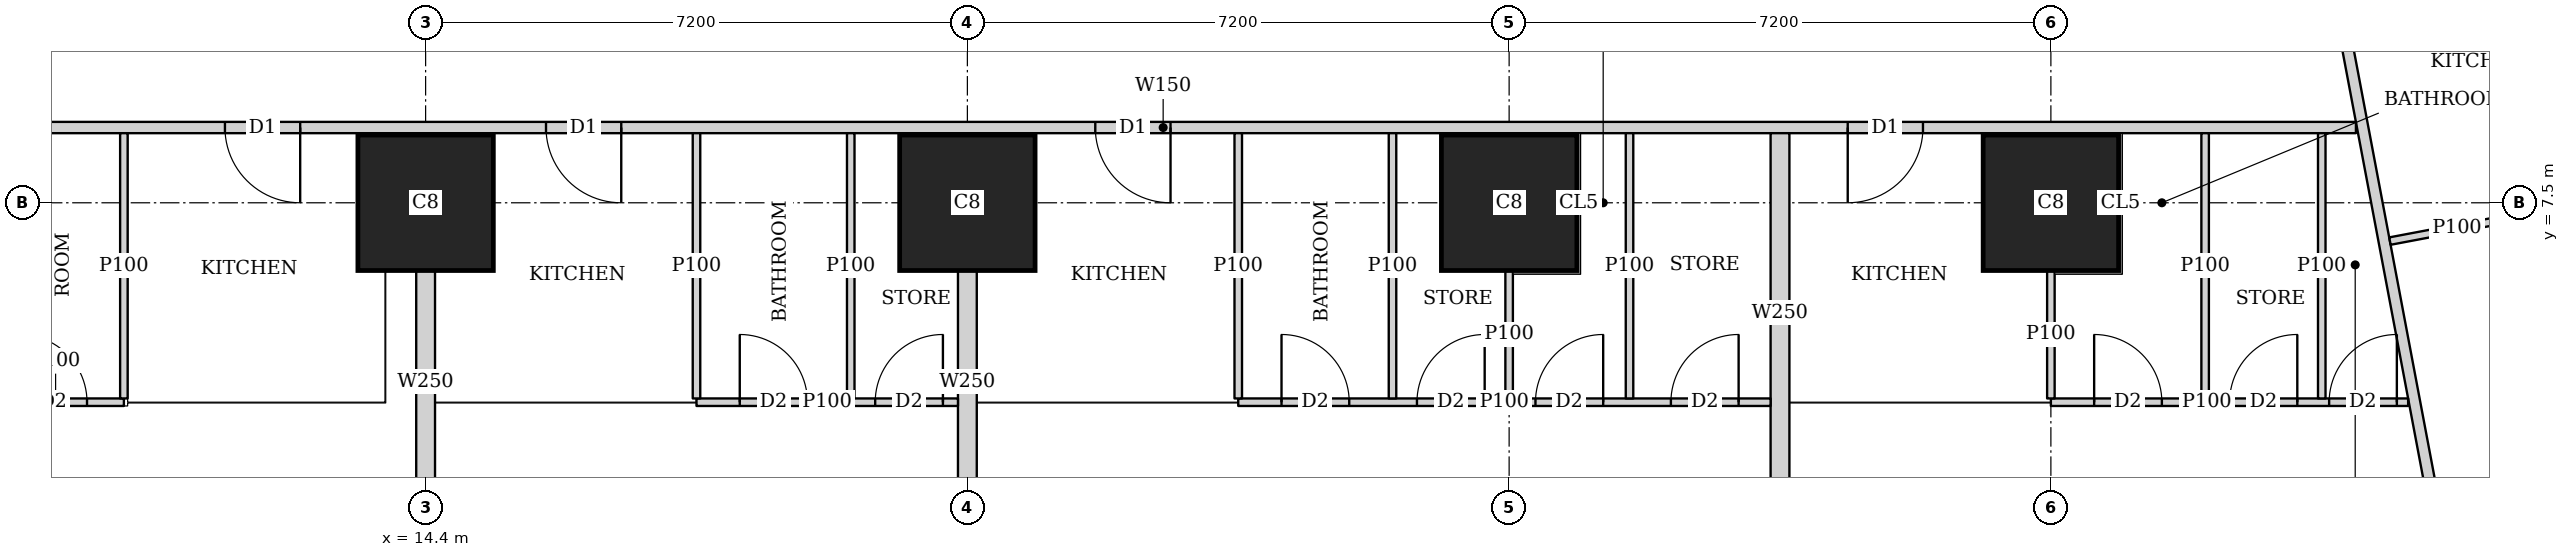
"""IFC4 building model, lengths in metres.
Left out: names, types, materials, properties, quantities, classifications, styles, units other than length and angle.
Written with IfcOpenShell. Run it as: python <this file> out.ifc"""

import sys

from ifc_helpers import new_model, si_unit, direction, frame, frame_2d, origin, origin_2d, place, context, subcontext, project, spatial, rectangle, extrude, element, fill, save


model = new_model("IFC4")
c1 = context("Model", 3, precision=1e-05, world=origin(), true_north=direction((0.0, 1.0)))
c2 = subcontext(c1, "Body", "Model", "MODEL_VIEW")
j1 = project(units=[si_unit("LENGTHUNIT", "METRE"), si_unit("PLANEANGLEUNIT", "RADIAN")], contexts=[c1])
p1 = place(None, origin())
s1 = spatial("IfcSite", under=j1, at=p1, CompositionType="ELEMENT")
p2 = place(p1, origin())
s2 = spatial("IfcBuilding", under=s1, at=p2, CompositionType="ELEMENT")
p3 = place(p2, frame((0.0, 0.0, 23.75)))
s3 = spatial("IfcBuildingStorey", under=s2, at=p3, CompositionType="ELEMENT", Elevation=23.75)
for number, where, z_axis, x_axis in (
    (1, (14.4, 7.5, 0.0), (0.0, 0.0, 1.0), (1.0, 0.0, 0.0)),
    (2, (21.6, 7.5, 0.0), (0.0, 0.0, 1.0), (1.0, 0.0, 0.0)),
    (3, (28.8, 7.5, 0.0), (0.0, 0.0, 1.0), (1.0, 0.0, 0.0)),
    (4, (36.0, 7.5, 0.0), (0.0, 0.0, 1.0), (1.0, 0.0, 0.0)),
):
    element("IfcColumn", number, at=place(p3, frame(where, z_axis=z_axis, x_axis=x_axis)), inside=s3, PredefinedType="COLUMN", context=c2, shape_type="SweptSolid", body=[
        extrude(rectangle(XDim=1.8, YDim=1.8, at=origin_2d()), origin(), (0.0, 0.0, 1.0), 3.75),
    ])
p4 = place(p3, frame((40.054, 8.5, 0.0), z_axis=(0.0, 0.0, 1.0), x_axis=(-1.0, 0.0, 0.0)))
e5 = element("IfcWall", 5, at=p4, inside=s3, PredefinedType="SOLIDWALL", context=c2, shape_type="SweptSolid", body=[
    extrude(rectangle(XDim=31.704, YDim=0.15, at=frame_2d((15.852, 0.0))), origin(), (0.0, 0.0, 1.0), 3.5),
])
p5 = place(p4, frame((27.321, 0.0, 0.0)))
e6 = element("IfcOpeningElement", 6, at=p5, cuts=e5, PredefinedType="OPENING", context=c2, shape_type="SweptSolid", body=[
    extrude(rectangle(XDim=1.0, YDim=2.1, at=frame_2d((0.5, 1.05))), frame((0.0, 0.085, 0.0), z_axis=(0.0, -1.0, 0.0), x_axis=(1.0, 0.0, 0.0)), (0.0, 0.0, 1.0), 0.17),
])
p6 = place(p4, frame((23.054, 0.0, 0.0)))
e7 = element("IfcOpeningElement", 7, at=p6, cuts=e5, PredefinedType="OPENING", context=c2, shape_type="SweptSolid", body=[
    extrude(rectangle(XDim=1.0, YDim=2.1, at=frame_2d((0.5, 1.05))), frame((0.0, 0.085, 0.0), z_axis=(0.0, -1.0, 0.0), x_axis=(1.0, 0.0, 0.0)), (0.0, 0.0, 1.0), 0.17),
])
p7 = place(p4, frame((15.754, 0.0, 0.0)))
e8 = element("IfcOpeningElement", 8, at=p7, cuts=e5, PredefinedType="OPENING", context=c2, shape_type="SweptSolid", body=[
    extrude(rectangle(XDim=1.0, YDim=2.1, at=frame_2d((0.5, 1.05))), frame((0.0, 0.085, 0.0), z_axis=(0.0, -1.0, 0.0), x_axis=(1.0, 0.0, 0.0)), (0.0, 0.0, 1.0), 0.17),
])
p8 = place(p4, frame((5.754, 0.0, 0.0)))
e9 = element("IfcOpeningElement", 9, at=p8, cuts=e5, PredefinedType="OPENING", context=c2, shape_type="SweptSolid", body=[
    extrude(rectangle(XDim=1.0, YDim=2.1, at=frame_2d((0.5, 1.05))), frame((0.0, 0.085, 0.0), z_axis=(0.0, -1.0, 0.0), x_axis=(1.0, 0.0, 0.0)), (0.0, 0.0, 1.0), 0.17),
])
p9 = place(p3, frame((33.755, 42.325, 0.0), z_axis=(0.0, 0.0, 1.0), x_axis=(0.185611461091, -0.982623216453, 0.0)))
e10 = element("IfcWall", 10, at=p9, inside=s3, PredefinedType="SOLIDWALL", context=c2, shape_type="SweptSolid", body=[
    extrude(rectangle(XDim=40.241, YDim=0.15, at=frame_2d((20.121, 0.0))), origin(), (0.0, 0.0, 1.0), 2.5),
])
p10 = place(p9, frame((7.325, 0.0, 0.0)))
e11 = element("IfcOpeningElement", 11, at=p10, cuts=e10, PredefinedType="OPENING", context=c2, shape_type="SweptSolid", body=[
    extrude(rectangle(XDim=1.0, YDim=2.1, at=frame_2d((0.5, 1.05))), frame((0.0, 0.085, 0.0), z_axis=(0.0, -1.0, 0.0), x_axis=(1.0, 0.0, 0.0)), (0.0, 0.0, 1.0), 0.17),
])
p11 = place(p9, frame((11.902, 0.0, 0.0)))
e12 = element("IfcOpeningElement", 12, at=p11, cuts=e10, PredefinedType="OPENING", context=c2, shape_type="SweptSolid", body=[
    extrude(rectangle(XDim=1.0, YDim=2.1, at=frame_2d((0.5, 1.05))), frame((0.0, 0.085, 0.0), z_axis=(0.0, -1.0, 0.0), x_axis=(1.0, 0.0, 0.0)), (0.0, 0.0, 1.0), 0.17),
])
p12 = place(p9, frame((25.718, 0.0, 0.0)))
e13 = element("IfcOpeningElement", 13, at=p12, cuts=e10, PredefinedType="OPENING", context=c2, shape_type="SweptSolid", body=[
    extrude(rectangle(XDim=1.0, YDim=2.1, at=frame_2d((0.5, 1.05))), frame((0.0, 0.085, 0.0), z_axis=(0.0, -1.0, 0.0), x_axis=(1.0, 0.0, 0.0)), (0.0, 0.0, 1.0), 0.17),
])
p13 = place(p9, frame((31.788, 0.0, 0.0)))
e14 = element("IfcOpeningElement", 14, at=p13, cuts=e10, PredefinedType="OPENING", context=c2, shape_type="SweptSolid", body=[
    extrude(rectangle(XDim=1.0, YDim=2.1, at=frame_2d((0.5, 1.05))), frame((0.0, 0.085, 0.0), z_axis=(0.0, -1.0, 0.0), x_axis=(1.0, 0.0, 0.0)), (0.0, 0.0, 1.0), 0.17),
])
p14 = place(p3, frame((10.39, 4.85, 0.0), z_axis=(0.0, 0.0, 1.0), x_axis=(-1.0, 0.0, 0.0)))
e15 = element("IfcWall", 15, at=p14, inside=s3, PredefinedType="PARTITIONING", context=c2, shape_type="SweptSolid", body=[
    extrude(rectangle(XDim=1.815, YDim=0.1, at=frame_2d((0.907, 0.0))), origin(), (0.0, 0.0, 1.0), 3.5),
])
p15 = place(p14, frame((0.49, 0.0, 0.0)))
e16 = element("IfcOpeningElement", 16, at=p15, cuts=e15, PredefinedType="OPENING", context=c2, shape_type="SweptSolid", body=[
    extrude(rectangle(XDim=0.9, YDim=2.1, at=frame_2d((0.45, 1.05))), frame((0.0, 0.06, 0.0), z_axis=(0.0, -1.0, 0.0), x_axis=(1.0, 0.0, 0.0)), (0.0, 0.0, 1.0), 0.12),
])
p16 = place(p3, frame((10.39, 4.9, 0.0), z_axis=(0.0, 0.0, 1.0), x_axis=(0.0, 1.0, 0.0)))
e17 = element("IfcWall", 17, at=p16, inside=s3, PredefinedType="PARTITIONING", context=c2, shape_type="SweptSolid", body=[
    extrude(rectangle(XDim=3.525, YDim=0.1, at=frame_2d((1.763, 0.0))), origin(), (0.0, 0.0, 1.0), 3.5),
])
p17 = place(p3, frame((21.475, 4.85, 0.0), z_axis=(0.0, 0.0, 1.0), x_axis=(-1.0, 0.0, 0.0)))
e18 = element("IfcWall", 18, at=p17, inside=s3, PredefinedType="PARTITIONING", context=c2, shape_type="SweptSolid", body=[
    extrude(rectangle(XDim=3.475, YDim=0.1, at=frame_2d((1.738, 0.0))), origin(), (0.0, 0.0, 1.0), 3.5),
])
p18 = place(p17, frame((2.0, 0.0, 0.0)))
e19 = element("IfcOpeningElement", 19, at=p18, cuts=e18, PredefinedType="OPENING", context=c2, shape_type="SweptSolid", body=[
    extrude(rectangle(XDim=0.9, YDim=2.1, at=frame_2d((0.45, 1.05))), frame((0.0, 0.06, 0.0), z_axis=(0.0, -1.0, 0.0), x_axis=(1.0, 0.0, 0.0)), (0.0, 0.0, 1.0), 0.12),
])
p19 = place(p17, frame((0.2, 0.0, 0.0)))
e20 = element("IfcOpeningElement", 20, at=p19, cuts=e18, PredefinedType="OPENING", context=c2, shape_type="SweptSolid", body=[
    extrude(rectangle(XDim=0.9, YDim=2.1, at=frame_2d((0.45, 1.05))), frame((0.0, 0.06, 0.0), z_axis=(0.0, -1.0, 0.0), x_axis=(1.0, 0.0, 0.0)), (0.0, 0.0, 1.0), 0.12),
])
for number, where, z_axis, x_axis in (
    (21, (18.0, 4.9, 0.0), (0.0, 0.0, 1.0), (0.0, 1.0, 0.0)),
    (22, (20.05, 4.9, 0.0), (0.0, 0.0, 1.0), (0.0, 1.0, 0.0)),
):
    element("IfcWall", number, at=place(p3, frame(where, z_axis=z_axis, x_axis=x_axis)), inside=s3, PredefinedType="PARTITIONING", context=c2, shape_type="SweptSolid", body=[
        extrude(rectangle(XDim=3.525, YDim=0.1, at=frame_2d((1.763, 0.0))), origin(), (0.0, 0.0, 1.0), 3.5),
    ])
p20 = place(p3, frame((14.4, 3.65, 0.0), z_axis=(0.0, 0.0, 1.0), x_axis=(0.0, 1.0, 0.0)))
e23 = element("IfcWall", 23, at=p20, inside=s3, PredefinedType="SOLIDWALL", context=c2, shape_type="SweptSolid", body=[
    extrude(rectangle(XDim=2.949, YDim=0.25, at=frame_2d((1.475, 0.0))), origin(), (0.0, 0.0, 1.0), 3.5),
])
p21 = place(p3, frame((32.275, 4.85, 0.0), z_axis=(0.0, 0.0, 1.0), x_axis=(-1.0, 0.0, 0.0)))
e24 = element("IfcWall", 24, at=p21, inside=s3, PredefinedType="PARTITIONING", context=c2, shape_type="SweptSolid", body=[
    extrude(rectangle(XDim=7.075, YDim=0.1, at=frame_2d((3.538, 0.0))), origin(), (0.0, 0.0, 1.0), 3.5),
])
p22 = place(p21, frame((5.6, 0.0, 0.0)))
e25 = element("IfcOpeningElement", 25, at=p22, cuts=e24, PredefinedType="OPENING", context=c2, shape_type="SweptSolid", body=[
    extrude(rectangle(XDim=0.9, YDim=2.1, at=frame_2d((0.45, 1.05))), frame((0.0, 0.06, 0.0), z_axis=(0.0, -1.0, 0.0), x_axis=(1.0, 0.0, 0.0)), (0.0, 0.0, 1.0), 0.12),
])
p23 = place(p21, frame((2.225, 0.0, 0.0)))
e26 = element("IfcOpeningElement", 26, at=p23, cuts=e24, PredefinedType="OPENING", context=c2, shape_type="SweptSolid", body=[
    extrude(rectangle(XDim=0.9, YDim=2.1, at=frame_2d((0.45, 1.05))), frame((0.0, 0.06, 0.0), z_axis=(0.0, -1.0, 0.0), x_axis=(1.0, 0.0, 0.0)), (0.0, 0.0, 1.0), 0.12),
])
p24 = place(p21, frame((3.8, 0.0, 0.0)))
e27 = element("IfcOpeningElement", 27, at=p24, cuts=e24, PredefinedType="OPENING", context=c2, shape_type="SweptSolid", body=[
    extrude(rectangle(XDim=0.9, YDim=2.1, at=frame_2d((0.45, 1.05))), frame((0.0, 0.06, 0.0), z_axis=(0.0, -1.0, 0.0), x_axis=(1.0, 0.0, 0.0)), (0.0, 0.0, 1.0), 0.12),
])
p25 = place(p21, frame((0.425, 0.0, 0.0)))
e28 = element("IfcOpeningElement", 28, at=p25, cuts=e24, PredefinedType="OPENING", context=c2, shape_type="SweptSolid", body=[
    extrude(rectangle(XDim=0.9, YDim=2.1, at=frame_2d((0.45, 1.05))), frame((0.0, 0.06, 0.0), z_axis=(0.0, -1.0, 0.0), x_axis=(1.0, 0.0, 0.0)), (0.0, 0.0, 1.0), 0.12),
])
p26 = place(p3, frame((25.2, 4.9, 0.0), z_axis=(0.0, 0.0, 1.0), x_axis=(0.0, 1.0, 0.0)))
e29 = element("IfcWall", 29, at=p26, inside=s3, PredefinedType="PARTITIONING", context=c2, shape_type="SweptSolid", body=[
    extrude(rectangle(XDim=3.525, YDim=0.1, at=frame_2d((1.763, 0.0))), origin(), (0.0, 0.0, 1.0), 3.5),
])
p27 = place(p3, frame((28.8, 4.9, 0.0), z_axis=(0.0, 0.0, 1.0), x_axis=(0.0, 1.0, 0.0)))
e30 = element("IfcWall", 30, at=p27, inside=s3, PredefinedType="PARTITIONING", context=c2, shape_type="SweptSolid", body=[
    extrude(rectangle(XDim=1.699, YDim=0.1, at=frame_2d((0.85, 0.0))), origin(), (0.0, 0.0, 1.0), 3.5),
])
for number, where, z_axis, x_axis in (
    (31, (27.25, 4.9, 0.0), (0.0, 0.0, 1.0), (0.0, 1.0, 0.0)),
    (32, (30.4, 4.9, 0.0), (0.0, 0.0, 1.0), (0.0, 1.0, 0.0)),
):
    element("IfcWall", number, at=place(p3, frame(where, z_axis=z_axis, x_axis=x_axis)), inside=s3, PredefinedType="PARTITIONING", context=c2, shape_type="SweptSolid", body=[
        extrude(rectangle(XDim=3.525, YDim=0.1, at=frame_2d((1.763, 0.0))), origin(), (0.0, 0.0, 1.0), 3.5),
    ])
p28 = place(p3, frame((21.6, 3.65, 0.0), z_axis=(0.0, 0.0, 1.0), x_axis=(0.0, 1.0, 0.0)))
e33 = element("IfcWall", 33, at=p28, inside=s3, PredefinedType="SOLIDWALL", context=c2, shape_type="SweptSolid", body=[
    extrude(rectangle(XDim=2.949, YDim=0.25, at=frame_2d((1.475, 0.0))), origin(), (0.0, 0.0, 1.0), 3.5),
])
p29 = place(p3, frame((40.748, 4.85, 0.0), z_axis=(0.0, 0.0, 1.0), x_axis=(-1.0, 0.0, 0.0)))
e34 = element("IfcWall", 34, at=p29, inside=s3, PredefinedType="PARTITIONING", context=c2, shape_type="SweptSolid", body=[
    extrude(rectangle(XDim=4.748, YDim=0.1, at=frame_2d((2.374, 0.0))), origin(), (0.0, 0.0, 1.0), 3.5),
])
p30 = place(p29, frame((3.273, 0.0, 0.0)))
e35 = element("IfcOpeningElement", 35, at=p30, cuts=e34, PredefinedType="OPENING", context=c2, shape_type="SweptSolid", body=[
    extrude(rectangle(XDim=0.9, YDim=2.1, at=frame_2d((0.45, 1.05))), frame((0.0, 0.06, 0.0), z_axis=(0.0, -1.0, 0.0), x_axis=(1.0, 0.0, 0.0)), (0.0, 0.0, 1.0), 0.12),
])
p31 = place(p29, frame((0.15, 0.0, 0.0)))
e36 = element("IfcOpeningElement", 36, at=p31, cuts=e34, PredefinedType="OPENING", context=c2, shape_type="SweptSolid", body=[
    extrude(rectangle(XDim=0.9, YDim=2.1, at=frame_2d((0.45, 1.05))), frame((0.0, 0.06, 0.0), z_axis=(0.0, -1.0, 0.0), x_axis=(1.0, 0.0, 0.0)), (0.0, 0.0, 1.0), 0.12),
])
p32 = place(p29, frame((1.473, 0.0, 0.0)))
e37 = element("IfcOpeningElement", 37, at=p32, cuts=e34, PredefinedType="OPENING", context=c2, shape_type="SweptSolid", body=[
    extrude(rectangle(XDim=0.9, YDim=2.1, at=frame_2d((0.45, 1.05))), frame((0.0, 0.06, 0.0), z_axis=(0.0, -1.0, 0.0), x_axis=(1.0, 0.0, 0.0)), (0.0, 0.0, 1.0), 0.12),
])
p33 = place(p3, frame((36.0, 4.9, 0.0), z_axis=(0.0, 0.0, 1.0), x_axis=(0.0, 1.0, 0.0)))
e38 = element("IfcWall", 38, at=p33, inside=s3, PredefinedType="PARTITIONING", context=c2, shape_type="SweptSolid", body=[
    extrude(rectangle(XDim=1.699, YDim=0.1, at=frame_2d((0.85, 0.0))), origin(), (0.0, 0.0, 1.0), 3.5),
])
for number, where, z_axis, x_axis in (
    (39, (39.6, 4.9, 0.0), (0.0, 0.0, 1.0), (0.0, 1.0, 0.0)),
    (40, (38.05, 4.9, 0.0), (0.0, 0.0, 1.0), (0.0, 1.0, 0.0)),
):
    element("IfcWall", number, at=place(p3, frame(where, z_axis=z_axis, x_axis=x_axis)), inside=s3, PredefinedType="PARTITIONING", context=c2, shape_type="SweptSolid", body=[
        extrude(rectangle(XDim=3.525, YDim=0.1, at=frame_2d((1.763, 0.0))), origin(), (0.0, 0.0, 1.0), 3.5),
    ])
p34 = place(p3, frame((32.4, 3.65, 0.0), z_axis=(0.0, 0.0, 1.0), x_axis=(0.0, 1.0, 0.0)))
e41 = element("IfcWall", 41, at=p34, inside=s3, PredefinedType="SOLIDWALL", context=c2, shape_type="SweptSolid", body=[
    extrude(rectangle(XDim=4.775, YDim=0.25, at=frame_2d((2.388, 0.0))), origin(), (0.0, 0.0, 1.0), 3.5),
])
p35 = place(p3, frame((42.29, 7.328, 0.0), z_axis=(0.0, 0.0, 1.0), x_axis=(-0.98262927905, -0.185579362952, 0.0)))
e42 = element("IfcWall", 42, at=p35, inside=s3, PredefinedType="PARTITIONING", context=c2, shape_type="SweptSolid", body=[
    extrude(rectangle(XDim=1.815, YDim=0.1, at=frame_2d((0.908, 0.0))), origin(), (0.0, 0.0, 1.0), 3.5),
])
p36 = place(p15, origin())
e43 = element("IfcDoor", 43, at=p36, inside=s3, OperationType="SINGLE_SWING_LEFT", PredefinedType="DOOR", context=c2, shape_type="SweptSolid", body=[
    extrude(rectangle(XDim=0.9, YDim=2.1, at=frame_2d((0.45, 1.05))), frame((0.0, 0.025, 0.0), z_axis=(0.0, -1.0, 0.0), x_axis=(1.0, 0.0, 0.0)), (0.0, 0.0, 1.0), 0.05),
])
fill(e16, e43)
p37 = place(p5, origin())
e44 = element("IfcDoor", 44, at=p37, inside=s3, OperationType="SINGLE_SWING_LEFT", PredefinedType="DOOR", context=c2, shape_type="SweptSolid", body=[
    extrude(rectangle(XDim=1.0, YDim=2.1, at=frame_2d((0.5, 1.05))), frame((0.0, 0.025, 0.0), z_axis=(0.0, -1.0, 0.0), x_axis=(1.0, 0.0, 0.0)), (0.0, 0.0, 1.0), 0.05),
])
fill(e6, e44)
p38 = place(p18, origin())
e45 = element("IfcDoor", 45, at=p38, inside=s3, OperationType="SINGLE_SWING_LEFT", PredefinedType="DOOR", context=c2, shape_type="SweptSolid", body=[
    extrude(rectangle(XDim=0.9, YDim=2.1, at=frame_2d((0.45, 1.05))), frame((0.0, 0.025, 0.0), z_axis=(0.0, -1.0, 0.0), x_axis=(1.0, 0.0, 0.0)), (0.0, 0.0, 1.0), 0.05),
])
fill(e19, e45)
p39 = place(p19, origin())
e46 = element("IfcDoor", 46, at=p39, inside=s3, OperationType="SINGLE_SWING_RIGHT", PredefinedType="DOOR", context=c2, shape_type="SweptSolid", body=[
    extrude(rectangle(XDim=0.9, YDim=2.1, at=frame_2d((0.45, 1.05))), frame((0.0, 0.025, 0.0), z_axis=(0.0, -1.0, 0.0), x_axis=(1.0, 0.0, 0.0)), (0.0, 0.0, 1.0), 0.05),
])
fill(e20, e46)
p40 = place(p6, origin())
e47 = element("IfcDoor", 47, at=p40, inside=s3, OperationType="SINGLE_SWING_LEFT", PredefinedType="DOOR", context=c2, shape_type="SweptSolid", body=[
    extrude(rectangle(XDim=1.0, YDim=2.1, at=frame_2d((0.5, 1.05))), frame((0.0, 0.025, 0.0), z_axis=(0.0, -1.0, 0.0), x_axis=(1.0, 0.0, 0.0)), (0.0, 0.0, 1.0), 0.05),
])
fill(e7, e47)
p41 = place(p22, origin())
e48 = element("IfcDoor", 48, at=p41, inside=s3, OperationType="SINGLE_SWING_LEFT", PredefinedType="DOOR", context=c2, shape_type="SweptSolid", body=[
    extrude(rectangle(XDim=0.9, YDim=2.1, at=frame_2d((0.45, 1.05))), frame((0.0, 0.025, 0.0), z_axis=(0.0, -1.0, 0.0), x_axis=(1.0, 0.0, 0.0)), (0.0, 0.0, 1.0), 0.05),
])
fill(e25, e48)
p42 = place(p23, origin())
e49 = element("IfcDoor", 49, at=p42, inside=s3, OperationType="SINGLE_SWING_RIGHT", PredefinedType="DOOR", context=c2, shape_type="SweptSolid", body=[
    extrude(rectangle(XDim=0.9, YDim=2.1, at=frame_2d((0.45, 1.05))), frame((0.0, 0.025, 0.0), z_axis=(0.0, -1.0, 0.0), x_axis=(1.0, 0.0, 0.0)), (0.0, 0.0, 1.0), 0.05),
])
fill(e26, e49)
p43 = place(p24, origin())
e50 = element("IfcDoor", 50, at=p43, inside=s3, OperationType="SINGLE_SWING_RIGHT", PredefinedType="DOOR", context=c2, shape_type="SweptSolid", body=[
    extrude(rectangle(XDim=0.9, YDim=2.1, at=frame_2d((0.45, 1.05))), frame((0.0, 0.025, 0.0), z_axis=(0.0, -1.0, 0.0), x_axis=(1.0, 0.0, 0.0)), (0.0, 0.0, 1.0), 0.05),
])
fill(e27, e50)
p44 = place(p25, origin())
e51 = element("IfcDoor", 51, at=p44, inside=s3, OperationType="SINGLE_SWING_RIGHT", PredefinedType="DOOR", context=c2, shape_type="SweptSolid", body=[
    extrude(rectangle(XDim=0.9, YDim=2.1, at=frame_2d((0.45, 1.05))), frame((0.0, 0.025, 0.0), z_axis=(0.0, -1.0, 0.0), x_axis=(1.0, 0.0, 0.0)), (0.0, 0.0, 1.0), 0.05),
])
fill(e28, e51)
p45 = place(p7, origin())
e52 = element("IfcDoor", 52, at=p45, inside=s3, OperationType="SINGLE_SWING_LEFT", PredefinedType="DOOR", context=c2, shape_type="SweptSolid", body=[
    extrude(rectangle(XDim=1.0, YDim=2.1, at=frame_2d((0.5, 1.05))), frame((0.0, 0.025, 0.0), z_axis=(0.0, -1.0, 0.0), x_axis=(1.0, 0.0, 0.0)), (0.0, 0.0, 1.0), 0.05),
])
fill(e8, e52)
p46 = place(p30, origin())
e53 = element("IfcDoor", 53, at=p46, inside=s3, OperationType="SINGLE_SWING_LEFT", PredefinedType="DOOR", context=c2, shape_type="SweptSolid", body=[
    extrude(rectangle(XDim=0.9, YDim=2.1, at=frame_2d((0.45, 1.05))), frame((0.0, 0.025, 0.0), z_axis=(0.0, -1.0, 0.0), x_axis=(1.0, 0.0, 0.0)), (0.0, 0.0, 1.0), 0.05),
])
fill(e35, e53)
p47 = place(p31, origin())
e54 = element("IfcDoor", 54, at=p47, inside=s3, OperationType="SINGLE_SWING_RIGHT", PredefinedType="DOOR", context=c2, shape_type="SweptSolid", body=[
    extrude(rectangle(XDim=0.9, YDim=2.1, at=frame_2d((0.45, 1.05))), frame((0.0, 0.025, 0.0), z_axis=(0.0, -1.0, 0.0), x_axis=(1.0, 0.0, 0.0)), (0.0, 0.0, 1.0), 0.05),
])
fill(e36, e54)
p48 = place(p32, origin())
e55 = element("IfcDoor", 55, at=p48, inside=s3, OperationType="SINGLE_SWING_RIGHT", PredefinedType="DOOR", context=c2, shape_type="SweptSolid", body=[
    extrude(rectangle(XDim=0.9, YDim=2.1, at=frame_2d((0.45, 1.05))), frame((0.0, 0.025, 0.0), z_axis=(0.0, -1.0, 0.0), x_axis=(1.0, 0.0, 0.0)), (0.0, 0.0, 1.0), 0.05),
])
fill(e37, e55)
p49 = place(p8, origin())
e56 = element("IfcDoor", 56, at=p49, inside=s3, OperationType="SINGLE_SWING_RIGHT", PredefinedType="DOOR", context=c2, shape_type="SweptSolid", body=[
    extrude(rectangle(XDim=1.0, YDim=2.1, at=frame_2d((0.5, 1.05))), frame((0.0, 0.025, 0.0), z_axis=(0.0, -1.0, 0.0), x_axis=(1.0, 0.0, 0.0)), (0.0, 0.0, 1.0), 0.05),
])
fill(e9, e56)
save(model, sys.argv[1])
